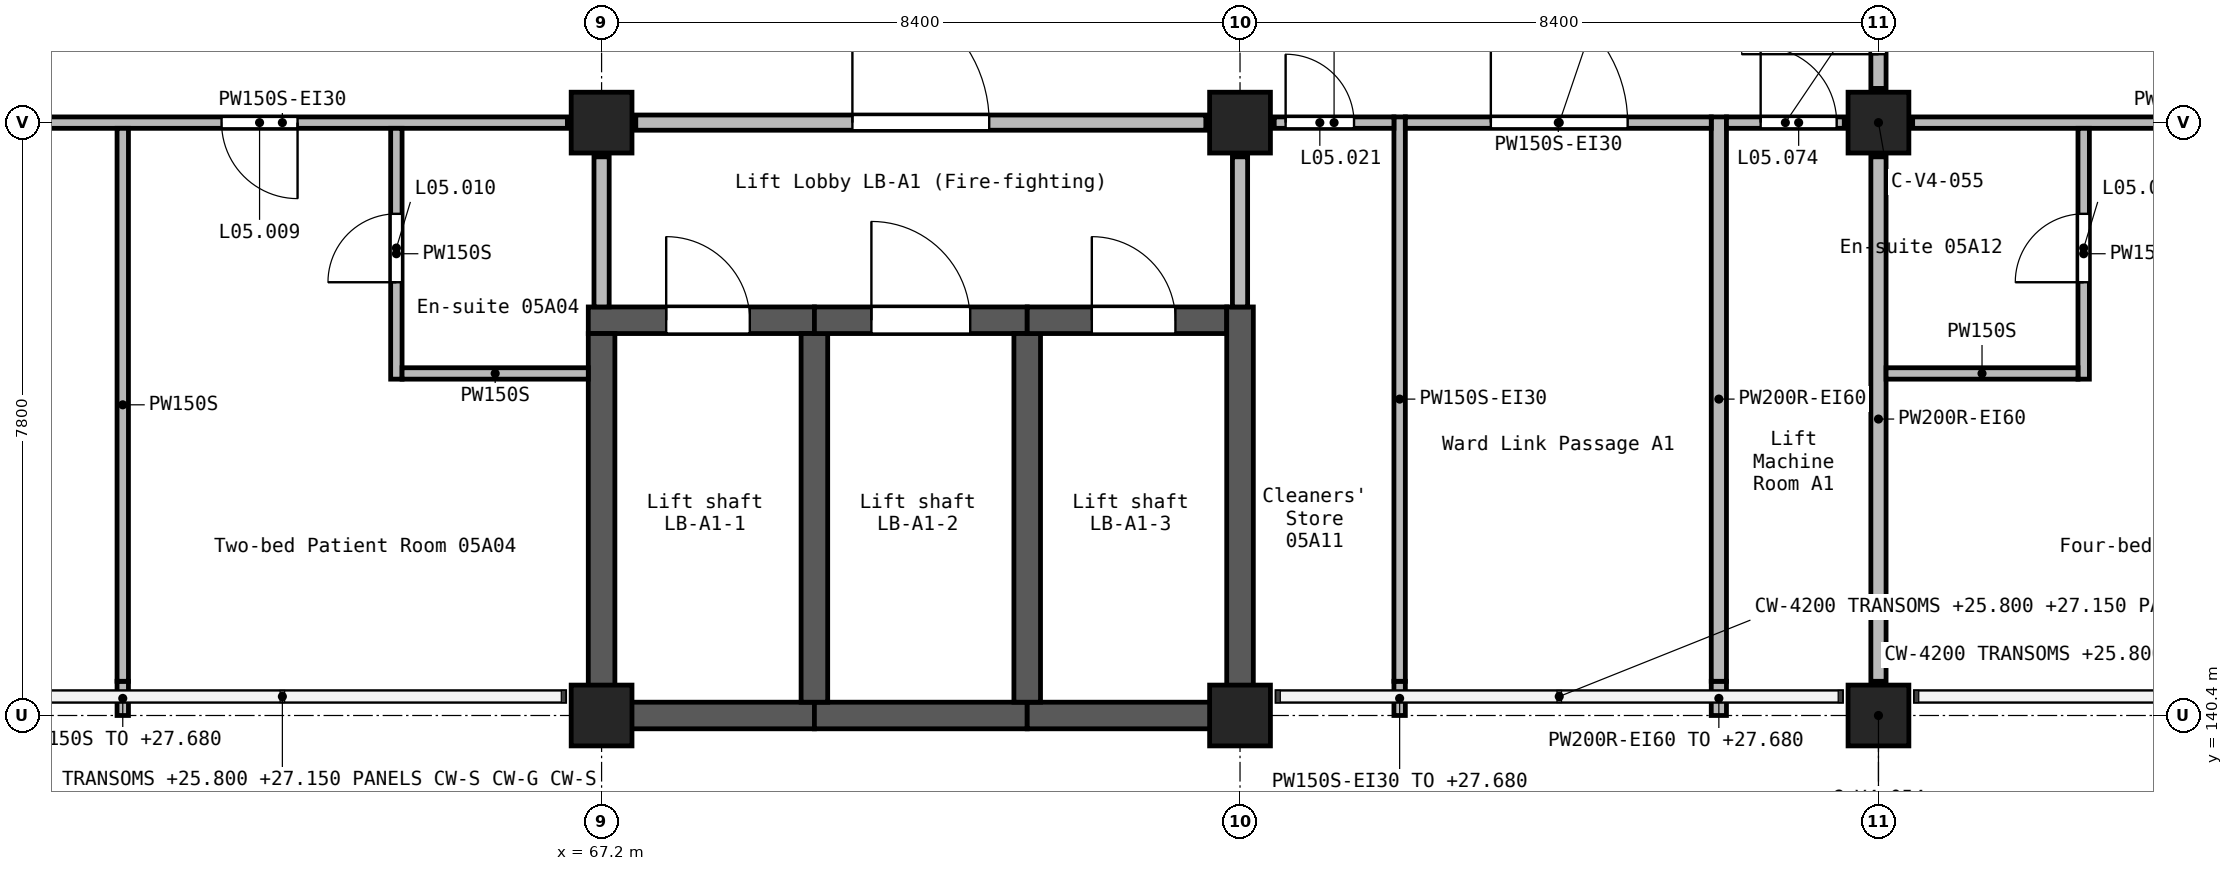
"""IFC4 building model, lengths in metres.
Left out: names, types, materials, properties, quantities, classifications, styles, units other than length and angle.
Written with IfcOpenShell. Run it as: python <this file> out.ifc"""

import sys

from ifc_helpers import new_model, si_unit, direction, frame, frame_2d, origin, origin_2d, place, context, subcontext, project, spatial, rectangle, extrude, element, fill, save


model = new_model("IFC4")
c1 = context("Model", 3, precision=1e-05, world=origin(), true_north=direction((0.0, 1.0)))
c2 = subcontext(c1, "Body", "Model", "MODEL_VIEW")
j1 = project(units=[si_unit("LENGTHUNIT", "METRE"), si_unit("PLANEANGLEUNIT", "RADIAN")], contexts=[c1])
p1 = place(None, origin())
s1 = spatial("IfcSite", under=j1, at=p1, CompositionType="ELEMENT")
p2 = place(p1, origin())
s2 = spatial("IfcBuilding", under=s1, at=p2, CompositionType="ELEMENT")
p3 = place(p2, frame((0.0, 0.0, 24.9)))
s3 = spatial("IfcBuildingStorey", under=s2, at=p3, CompositionType="ELEMENT", Elevation=24.9)
for number, where, z_axis, x_axis in (
    (1, (67.2, 140.4, 0.0), (0.0, 0.0, 1.0), (1.0, 0.0, 0.0)),
    (2, (67.2, 148.2, 0.0), (0.0, 0.0, 1.0), (1.0, 0.0, 0.0)),
    (3, (75.6, 140.4, 0.0), (0.0, 0.0, 1.0), (1.0, 0.0, 0.0)),
    (4, (75.6, 148.2, 0.0), (0.0, 0.0, 1.0), (1.0, 0.0, 0.0)),
    (5, (84.0, 140.4, 0.0), (0.0, 0.0, 1.0), (1.0, 0.0, 0.0)),
    (6, (84.0, 148.2, 0.0), (0.0, 0.0, 1.0), (1.0, 0.0, 0.0)),
):
    element("IfcColumn", number, at=place(p3, frame(where, z_axis=z_axis, x_axis=x_axis)), inside=s3, PredefinedType="COLUMN", context=c2, shape_type="SweptSolid", body=[
        extrude(rectangle(XDim=0.8, YDim=0.8, at=origin_2d()), origin(), (0.0, 0.0, 1.0), 3.9),
    ])
p4 = place(p3, frame((67.025, 145.6, 0.0), z_axis=(0.0, 0.0, 1.0), x_axis=(1.0, 0.0, 0.0)))
e7 = element("IfcWall", 7, at=p4, inside=s3, PredefinedType="SHEAR", context=c2, shape_type="SweptSolid", body=[
    extrude(rectangle(XDim=2.975, YDim=0.35, at=frame_2d((1.488, 0.0))), origin(), (0.0, 0.0, 1.0), 3.9),
])
p5 = place(p4, frame((1.025, 0.0, 0.0)))
e8 = element("IfcOpeningElement", 8, at=p5, cuts=e7, PredefinedType="OPENING", context=c2, shape_type="SweptSolid", body=[
    extrude(rectangle(XDim=1.1, YDim=2.1, at=frame_2d((0.55, 1.05))), frame((0.0, 0.185, 0.0), z_axis=(0.0, -1.0, 0.0), x_axis=(1.0, 0.0, 0.0)), (0.0, 0.0, 1.0), 0.37),
])
p6 = place(p3, frame((67.2, 140.225, 0.0), z_axis=(0.0, 0.0, 1.0), x_axis=(0.0, 1.0, 0.0)))
e9 = element("IfcWall", 9, at=p6, inside=s3, PredefinedType="SHEAR", context=c2, shape_type="SweptSolid", body=[
    extrude(rectangle(XDim=5.2, YDim=0.35, at=frame_2d((2.6, 0.0))), origin(), (0.0, 0.0, 1.0), 3.9),
])
p7 = place(p3, frame((67.375, 140.4, 0.0), z_axis=(0.0, 0.0, 1.0), x_axis=(1.0, 0.0, 0.0)))
e10 = element("IfcWall", 10, at=p7, inside=s3, PredefinedType="SHEAR", context=c2, shape_type="SweptSolid", body=[
    extrude(rectangle(XDim=2.625, YDim=0.35, at=frame_2d((1.312, 0.0))), origin(), (0.0, 0.0, 1.0), 3.9),
])
p8 = place(p3, frame((70.0, 140.4, 0.0), z_axis=(0.0, 0.0, 1.0), x_axis=(1.0, 0.0, 0.0)))
e11 = element("IfcWall", 11, at=p8, inside=s3, PredefinedType="SHEAR", context=c2, shape_type="SweptSolid", body=[
    extrude(rectangle(XDim=2.8, YDim=0.35, at=frame_2d((1.4, 0.0))), origin(), (0.0, 0.0, 1.0), 3.9),
])
p9 = place(p3, frame((70.0, 140.575, 0.0), z_axis=(0.0, 0.0, 1.0), x_axis=(0.0, 1.0, 0.0)))
e12 = element("IfcWall", 12, at=p9, inside=s3, PredefinedType="SHEAR", context=c2, shape_type="SweptSolid", body=[
    extrude(rectangle(XDim=4.85, YDim=0.35, at=frame_2d((2.425, 0.0))), origin(), (0.0, 0.0, 1.0), 3.9),
])
p10 = place(p3, frame((70.0, 145.6, 0.0), z_axis=(0.0, 0.0, 1.0), x_axis=(1.0, 0.0, 0.0)))
e13 = element("IfcWall", 13, at=p10, inside=s3, PredefinedType="SHEAR", context=c2, shape_type="SweptSolid", body=[
    extrude(rectangle(XDim=2.8, YDim=0.35, at=frame_2d((1.4, 0.0))), origin(), (0.0, 0.0, 1.0), 3.9),
])
p11 = place(p10, frame((0.75, 0.0, 0.0)))
e14 = element("IfcOpeningElement", 14, at=p11, cuts=e13, PredefinedType="OPENING", context=c2, shape_type="SweptSolid", body=[
    extrude(rectangle(XDim=1.3, YDim=2.1, at=frame_2d((0.65, 1.05))), frame((0.0, 0.185, 0.0), z_axis=(0.0, -1.0, 0.0), x_axis=(1.0, 0.0, 0.0)), (0.0, 0.0, 1.0), 0.37),
])
p12 = place(p3, frame((72.8, 140.4, 0.0), z_axis=(0.0, 0.0, 1.0), x_axis=(1.0, 0.0, 0.0)))
e15 = element("IfcWall", 15, at=p12, inside=s3, PredefinedType="SHEAR", context=c2, shape_type="SweptSolid", body=[
    extrude(rectangle(XDim=2.625, YDim=0.35, at=frame_2d((1.312, 0.0))), origin(), (0.0, 0.0, 1.0), 3.9),
])
p13 = place(p3, frame((72.8, 140.575, 0.0), z_axis=(0.0, 0.0, 1.0), x_axis=(0.0, 1.0, 0.0)))
e16 = element("IfcWall", 16, at=p13, inside=s3, PredefinedType="SHEAR", context=c2, shape_type="SweptSolid", body=[
    extrude(rectangle(XDim=4.85, YDim=0.35, at=frame_2d((2.425, 0.0))), origin(), (0.0, 0.0, 1.0), 3.9),
])
p14 = place(p3, frame((72.8, 145.6, 0.0), z_axis=(0.0, 0.0, 1.0), x_axis=(1.0, 0.0, 0.0)))
e17 = element("IfcWall", 17, at=p14, inside=s3, PredefinedType="SHEAR", context=c2, shape_type="SweptSolid", body=[
    extrude(rectangle(XDim=2.625, YDim=0.35, at=frame_2d((1.312, 0.0))), origin(), (0.0, 0.0, 1.0), 3.9),
])
p15 = place(p14, frame((0.85, 0.0, 0.0)))
e18 = element("IfcOpeningElement", 18, at=p15, cuts=e17, PredefinedType="OPENING", context=c2, shape_type="SweptSolid", body=[
    extrude(rectangle(XDim=1.1, YDim=2.1, at=frame_2d((0.55, 1.05))), frame((0.0, 0.185, 0.0), z_axis=(0.0, -1.0, 0.0), x_axis=(1.0, 0.0, 0.0)), (0.0, 0.0, 1.0), 0.37),
])
p16 = place(p3, frame((75.6, 140.225, 0.0), z_axis=(0.0, 0.0, 1.0), x_axis=(0.0, 1.0, 0.0)))
e19 = element("IfcWall", 19, at=p16, inside=s3, PredefinedType="SHEAR", context=c2, shape_type="SweptSolid", body=[
    extrude(rectangle(XDim=5.55, YDim=0.35, at=frame_2d((2.775, 0.0))), origin(), (0.0, 0.0, 1.0), 3.9),
])
p17 = place(p3, frame((84.0, 148.65, 0.0), z_axis=(0.0, 0.0, 1.0), x_axis=(0.0, 1.0, 0.0)))
e20 = element("IfcWall", 20, at=p17, inside=s3, PredefinedType="SOLIDWALL", context=c2, shape_type="SweptSolid", body=[
    extrude(rectangle(XDim=2.7, YDim=0.2, at=frame_2d((1.35, 0.0))), origin(), (0.0, 0.0, 1.0), 3.6),
])
p18 = place(p17, frame((0.45, 0.0, 0.0)))
e21 = element("IfcOpeningElement", 21, at=p18, cuts=e20, PredefinedType="OPENING", context=c2, shape_type="SweptSolid", body=[
    extrude(rectangle(XDim=1.8, YDim=2.1, at=frame_2d((0.9, 1.05))), frame((0.0, 0.11, 0.0), z_axis=(0.0, -1.0, 0.0), x_axis=(1.0, 0.0, 0.0)), (0.0, 0.0, 1.0), 0.22),
])
p19 = place(p3, frame((67.65, 148.2, 0.0), z_axis=(0.0, 0.0, 1.0), x_axis=(1.0, 0.0, 0.0)))
e22 = element("IfcWall", 22, at=p19, inside=s3, PredefinedType="SOLIDWALL", context=c2, shape_type="SweptSolid", body=[
    extrude(rectangle(XDim=7.5, YDim=0.2, at=frame_2d((3.75, 0.0))), origin(), (0.0, 0.0, 1.0), 3.6),
])
p20 = place(p19, frame((2.85, 0.0, 0.0)))
e23 = element("IfcOpeningElement", 23, at=p20, cuts=e22, PredefinedType="OPENING", context=c2, shape_type="SweptSolid", body=[
    extrude(rectangle(XDim=1.8, YDim=2.1, at=frame_2d((0.9, 1.05))), frame((0.0, 0.11, 0.0), z_axis=(0.0, -1.0, 0.0), x_axis=(1.0, 0.0, 0.0)), (0.0, 0.0, 1.0), 0.22),
])
p21 = place(p3, frame((81.9, 140.4, 0.0), z_axis=(0.0, 0.0, 1.0), x_axis=(0.0, 1.0, 0.0)))
e24 = element("IfcWall", 24, at=p21, inside=s3, PredefinedType="SOLIDWALL", context=c2, shape_type="SweptSolid", body=[
    extrude(rectangle(XDim=0.45, YDim=0.2, at=frame_2d((0.225, 0.0))), origin(), (0.0, 0.0, 1.0), 2.78),
])
p22 = place(p3, frame((81.9, 140.85, 0.0), z_axis=(0.0, 0.0, 1.0), x_axis=(0.0, 1.0, 0.0)))
e25 = element("IfcWall", 25, at=p22, inside=s3, PredefinedType="SOLIDWALL", context=c2, shape_type="SweptSolid", body=[
    extrude(rectangle(XDim=7.425, YDim=0.2, at=frame_2d((3.712, 0.0))), origin(), (0.0, 0.0, 1.0), 3.6),
])
p23 = place(p3, frame((84.0, 140.85, 0.0), z_axis=(0.0, 0.0, 1.0), x_axis=(0.0, 1.0, 0.0)))
e26 = element("IfcWall", 26, at=p23, inside=s3, PredefinedType="SOLIDWALL", context=c2, shape_type="SweptSolid", body=[
    extrude(rectangle(XDim=6.9, YDim=0.2, at=frame_2d((3.45, 0.0))), origin(), (0.0, 0.0, 1.0), 3.6),
])
for number, where, z_axis, x_axis in (
    (27, (67.2, 145.775, 0.0), (0.0, 0.0, 1.0), (0.0, 1.0, 0.0)),
    (28, (75.6, 145.775, 0.0), (0.0, 0.0, 1.0), (0.0, 1.0, 0.0)),
):
    element("IfcWall", number, at=place(p3, frame(where, z_axis=z_axis, x_axis=x_axis)), inside=s3, PredefinedType="SOLIDWALL", context=c2, shape_type="SweptSolid", body=[
        extrude(rectangle(XDim=1.975, YDim=0.2, at=frame_2d((0.988, 0.0))), origin(), (0.0, 0.0, 1.0), 3.6),
    ])
p24 = place(p3, frame((91.95, 148.2, 0.0), z_axis=(0.0, 0.0, 1.0), x_axis=(-1.0, 0.0, 0.0)))
e29 = element("IfcWall", 29, at=p24, inside=s3, PredefinedType="PARTITIONING", context=c2, shape_type="SweptSolid", body=[
    extrude(rectangle(XDim=7.5, YDim=0.15, at=frame_2d((3.75, 0.0))), origin(), (0.0, 0.0, 1.0), 3.6),
])
p25 = place(p24, frame((1.9, 0.0, 0.0)))
e30 = element("IfcOpeningElement", 30, at=p25, cuts=e29, PredefinedType="OPENING", context=c2, shape_type="SweptSolid", body=[
    extrude(rectangle(XDim=1.0, YDim=2.1, at=frame_2d((0.5, 1.05))), frame((0.0, 0.085, 0.0), z_axis=(0.0, -1.0, 0.0), x_axis=(1.0, 0.0, 0.0)), (0.0, 0.0, 1.0), 0.17),
])
p26 = place(p3, frame((66.75, 148.2, 0.0), z_axis=(0.0, 0.0, 1.0), x_axis=(-1.0, 0.0, 0.0)))
e31 = element("IfcWall", 31, at=p26, inside=s3, PredefinedType="PARTITIONING", context=c2, shape_type="SweptSolid", body=[
    extrude(rectangle(XDim=7.5, YDim=0.15, at=frame_2d((3.75, 0.0))), origin(), (0.0, 0.0, 1.0), 3.6),
])
p27 = place(p26, frame((3.55, 0.0, 0.0)))
e32 = element("IfcOpeningElement", 32, at=p27, cuts=e31, PredefinedType="OPENING", context=c2, shape_type="SweptSolid", body=[
    extrude(rectangle(XDim=1.0, YDim=2.1, at=frame_2d((0.5, 1.05))), frame((0.0, 0.085, 0.0), z_axis=(0.0, -1.0, 0.0), x_axis=(1.0, 0.0, 0.0)), (0.0, 0.0, 1.0), 0.17),
])
p28 = place(p3, frame((77.7, 140.4, 0.0), z_axis=(0.0, 0.0, 1.0), x_axis=(0.0, 1.0, 0.0)))
e33 = element("IfcWall", 33, at=p28, inside=s3, PredefinedType="PARTITIONING", context=c2, shape_type="SweptSolid", body=[
    extrude(rectangle(XDim=0.45, YDim=0.15, at=frame_2d((0.225, 0.0))), origin(), (0.0, 0.0, 1.0), 2.78),
])
p29 = place(p3, frame((77.7, 140.85, 0.0), z_axis=(0.0, 0.0, 1.0), x_axis=(0.0, 1.0, 0.0)))
e34 = element("IfcWall", 34, at=p29, inside=s3, PredefinedType="PARTITIONING", context=c2, shape_type="SweptSolid", body=[
    extrude(rectangle(XDim=7.425, YDim=0.15, at=frame_2d((3.712, 0.0))), origin(), (0.0, 0.0, 1.0), 3.6),
])
p30 = place(p3, frame((77.775, 148.2, 0.0), z_axis=(0.0, 0.0, 1.0), x_axis=(1.0, 0.0, 0.0)))
e35 = element("IfcWall", 35, at=p30, inside=s3, PredefinedType="PARTITIONING", context=c2, shape_type="SweptSolid", body=[
    extrude(rectangle(XDim=4.025, YDim=0.15, at=frame_2d((2.013, 0.0))), origin(), (0.0, 0.0, 1.0), 3.6),
])
p31 = place(p30, frame((1.125, 0.0, 0.0)))
e36 = element("IfcOpeningElement", 36, at=p31, cuts=e35, PredefinedType="OPENING", context=c2, shape_type="SweptSolid", body=[
    extrude(rectangle(XDim=1.8, YDim=2.1, at=frame_2d((0.9, 1.05))), frame((0.0, 0.085, 0.0), z_axis=(0.0, -1.0, 0.0), x_axis=(1.0, 0.0, 0.0)), (0.0, 0.0, 1.0), 0.17),
])
p32 = place(p3, frame((76.05, 148.2, 0.0), z_axis=(0.0, 0.0, 1.0), x_axis=(1.0, 0.0, 0.0)))
e37 = element("IfcWall", 37, at=p32, inside=s3, PredefinedType="PARTITIONING", context=c2, shape_type="SweptSolid", body=[
    extrude(rectangle(XDim=1.575, YDim=0.15, at=frame_2d((0.788, 0.0))), origin(), (0.0, 0.0, 1.0), 3.6),
])
p33 = place(p32, frame((0.15, 0.0, 0.0)))
e38 = element("IfcOpeningElement", 38, at=p33, cuts=e37, PredefinedType="OPENING", context=c2, shape_type="SweptSolid", body=[
    extrude(rectangle(XDim=0.9, YDim=2.1, at=frame_2d((0.45, 1.05))), frame((0.0, 0.085, 0.0), z_axis=(0.0, -1.0, 0.0), x_axis=(1.0, 0.0, 0.0)), (0.0, 0.0, 1.0), 0.17),
])
p34 = place(p3, frame((82.0, 148.2, 0.0), z_axis=(0.0, 0.0, 1.0), x_axis=(1.0, 0.0, 0.0)))
e39 = element("IfcWall", 39, at=p34, inside=s3, PredefinedType="PARTITIONING", context=c2, shape_type="SweptSolid", body=[
    extrude(rectangle(XDim=1.55, YDim=0.15, at=frame_2d((0.775, 0.0))), origin(), (0.0, 0.0, 1.0), 3.6),
])
p35 = place(p34, frame((0.45, 0.0, 0.0)))
e40 = element("IfcOpeningElement", 40, at=p35, cuts=e39, PredefinedType="OPENING", context=c2, shape_type="SweptSolid", body=[
    extrude(rectangle(XDim=1.0, YDim=2.1, at=frame_2d((0.5, 1.05))), frame((0.0, 0.085, 0.0), z_axis=(0.0, -1.0, 0.0), x_axis=(1.0, 0.0, 0.0)), (0.0, 0.0, 1.0), 0.17),
])
p36 = place(p3, frame((60.9, 140.4, 0.0), z_axis=(0.0, 0.0, 1.0), x_axis=(0.0, 1.0, 0.0)))
e41 = element("IfcWall", 41, at=p36, inside=s3, PredefinedType="PARTITIONING", context=c2, shape_type="SweptSolid", body=[
    extrude(rectangle(XDim=0.45, YDim=0.15, at=frame_2d((0.225, 0.0))), origin(), (0.0, 0.0, 1.0), 2.78),
])
p37 = place(p3, frame((60.9, 140.85, 0.0), z_axis=(0.0, 0.0, 1.0), x_axis=(0.0, 1.0, 0.0)))
e42 = element("IfcWall", 42, at=p37, inside=s3, PredefinedType="PARTITIONING", context=c2, shape_type="SweptSolid", body=[
    extrude(rectangle(XDim=7.275, YDim=0.15, at=frame_2d((3.637, 0.0))), origin(), (0.0, 0.0, 1.0), 3.6),
])
p38 = place(p3, frame((64.5, 144.825, 0.0), z_axis=(0.0, 0.0, 1.0), x_axis=(0.0, 1.0, 0.0)))
e43 = element("IfcWall", 43, at=p38, inside=s3, PredefinedType="PARTITIONING", context=c2, shape_type="SweptSolid", body=[
    extrude(rectangle(XDim=3.3, YDim=0.15, at=frame_2d((1.65, 0.0))), origin(), (0.0, 0.0, 1.0), 3.6),
])
p39 = place(p38, frame((1.275, 0.0, 0.0)))
e44 = element("IfcOpeningElement", 44, at=p39, cuts=e43, PredefinedType="OPENING", context=c2, shape_type="SweptSolid", body=[
    extrude(rectangle(XDim=0.9, YDim=2.1, at=frame_2d((0.45, 1.05))), frame((0.0, 0.085, 0.0), z_axis=(0.0, -1.0, 0.0), x_axis=(1.0, 0.0, 0.0)), (0.0, 0.0, 1.0), 0.17),
])
p40 = place(p3, frame((86.7, 144.825, 0.0), z_axis=(0.0, 0.0, 1.0), x_axis=(0.0, 1.0, 0.0)))
e45 = element("IfcWall", 45, at=p40, inside=s3, PredefinedType="PARTITIONING", context=c2, shape_type="SweptSolid", body=[
    extrude(rectangle(XDim=3.3, YDim=0.15, at=frame_2d((1.65, 0.0))), origin(), (0.0, 0.0, 1.0), 3.6),
])
p41 = place(p40, frame((1.275, 0.0, 0.0)))
e46 = element("IfcOpeningElement", 46, at=p41, cuts=e45, PredefinedType="OPENING", context=c2, shape_type="SweptSolid", body=[
    extrude(rectangle(XDim=0.9, YDim=2.1, at=frame_2d((0.45, 1.05))), frame((0.0, 0.085, 0.0), z_axis=(0.0, -1.0, 0.0), x_axis=(1.0, 0.0, 0.0)), (0.0, 0.0, 1.0), 0.17),
])
p42 = place(p3, frame((64.575, 144.9, 0.0), z_axis=(0.0, 0.0, 1.0), x_axis=(1.0, 0.0, 0.0)))
e47 = element("IfcWall", 47, at=p42, inside=s3, PredefinedType="PARTITIONING", context=c2, shape_type="SweptSolid", body=[
    extrude(rectangle(XDim=2.45, YDim=0.15, at=frame_2d((1.225, 0.0))), origin(), (0.0, 0.0, 1.0), 3.6),
])
p43 = place(p3, frame((84.1, 144.9, 0.0), z_axis=(0.0, 0.0, 1.0), x_axis=(1.0, 0.0, 0.0)))
e48 = element("IfcWall", 48, at=p43, inside=s3, PredefinedType="PARTITIONING", context=c2, shape_type="SweptSolid", body=[
    extrude(rectangle(XDim=2.525, YDim=0.15, at=frame_2d((1.262, 0.0))), origin(), (0.0, 0.0, 1.0), 3.6),
])
p44 = place(p18, frame((1.8, 0.0, 0.0), z_axis=(0.0, 0.0, 1.0), x_axis=(-1.0, 0.0, 0.0)))
e49 = element("IfcDoor", 49, at=p44, inside=s3, OperationType="DOUBLE_DOOR_SINGLE_SWING", PredefinedType="DOOR", context=c2, shape_type="SweptSolid", body=[
    extrude(rectangle(XDim=1.8, YDim=2.1, at=frame_2d((0.9, 1.05))), frame((0.0, 0.025, 0.0), z_axis=(0.0, -1.0, 0.0), x_axis=(1.0, 0.0, 0.0)), (0.0, 0.0, 1.0), 0.05),
])
fill(e21, e49)
p45 = place(p27, origin())
e50 = element("IfcDoor", 50, at=p45, inside=s3, OperationType="SINGLE_SWING_RIGHT", PredefinedType="DOOR", context=c2, shape_type="SweptSolid", body=[
    extrude(rectangle(XDim=1.0, YDim=2.1, at=frame_2d((0.5, 1.05))), frame((0.0, 0.025, 0.0), z_axis=(0.0, -1.0, 0.0), x_axis=(1.0, 0.0, 0.0)), (0.0, 0.0, 1.0), 0.05),
])
fill(e32, e50)
p46 = place(p39, frame((0.9, 0.0, 0.0), z_axis=(0.0, 0.0, 1.0), x_axis=(-1.0, 0.0, 0.0)))
e51 = element("IfcDoor", 51, at=p46, inside=s3, OperationType="SINGLE_SWING_LEFT", PredefinedType="DOOR", context=c2, shape_type="SweptSolid", body=[
    extrude(rectangle(XDim=0.9, YDim=2.1, at=frame_2d((0.45, 1.05))), frame((0.0, 0.025, 0.0), z_axis=(0.0, -1.0, 0.0), x_axis=(1.0, 0.0, 0.0)), (0.0, 0.0, 1.0), 0.05),
])
fill(e44, e51)
p47 = place(p33, frame((0.9, 0.0, 0.0), z_axis=(0.0, 0.0, 1.0), x_axis=(-1.0, 0.0, 0.0)))
e52 = element("IfcDoor", 52, at=p47, inside=s3, OperationType="SINGLE_SWING_RIGHT", PredefinedType="DOOR", context=c2, shape_type="SweptSolid", body=[
    extrude(rectangle(XDim=0.9, YDim=2.1, at=frame_2d((0.45, 1.05))), frame((0.0, 0.025, 0.0), z_axis=(0.0, -1.0, 0.0), x_axis=(1.0, 0.0, 0.0)), (0.0, 0.0, 1.0), 0.05),
])
fill(e38, e52)
p48 = place(p41, origin())
e53 = element("IfcDoor", 53, at=p48, inside=s3, OperationType="SINGLE_SWING_RIGHT", PredefinedType="DOOR", context=c2, shape_type="SweptSolid", body=[
    extrude(rectangle(XDim=0.9, YDim=2.1, at=frame_2d((0.45, 1.05))), frame((0.0, 0.025, 0.0), z_axis=(0.0, -1.0, 0.0), x_axis=(1.0, 0.0, 0.0)), (0.0, 0.0, 1.0), 0.05),
])
fill(e46, e53)
p49 = place(p31, frame((1.8, 0.0, 0.0), z_axis=(0.0, 0.0, 1.0), x_axis=(-1.0, 0.0, 0.0)))
e54 = element("IfcDoor", 54, at=p49, inside=s3, OperationType="DOUBLE_DOOR_SINGLE_SWING", PredefinedType="DOOR", context=c2, shape_type="SweptSolid", body=[
    extrude(rectangle(XDim=1.8, YDim=2.1, at=frame_2d((0.9, 1.05))), frame((0.0, 0.025, 0.0), z_axis=(0.0, -1.0, 0.0), x_axis=(1.0, 0.0, 0.0)), (0.0, 0.0, 1.0), 0.05),
])
fill(e36, e54)
p50 = place(p20, frame((1.8, 0.0, 0.0), z_axis=(0.0, 0.0, 1.0), x_axis=(-1.0, 0.0, 0.0)))
e55 = element("IfcDoor", 55, at=p50, inside=s3, OperationType="DOUBLE_DOOR_SINGLE_SWING", PredefinedType="DOOR", context=c2, shape_type="SweptSolid", body=[
    extrude(rectangle(XDim=1.8, YDim=2.1, at=frame_2d((0.9, 1.05))), frame((0.0, 0.025, 0.0), z_axis=(0.0, -1.0, 0.0), x_axis=(1.0, 0.0, 0.0)), (0.0, 0.0, 1.0), 0.05),
])
fill(e23, e55)
p51 = place(p35, frame((1.0, 0.0, 0.0), z_axis=(0.0, 0.0, 1.0), x_axis=(-1.0, 0.0, 0.0)))
e56 = element("IfcDoor", 56, at=p51, inside=s3, OperationType="SINGLE_SWING_LEFT", PredefinedType="DOOR", context=c2, shape_type="SweptSolid", body=[
    extrude(rectangle(XDim=1.0, YDim=2.1, at=frame_2d((0.5, 1.05))), frame((0.0, 0.025, 0.0), z_axis=(0.0, -1.0, 0.0), x_axis=(1.0, 0.0, 0.0)), (0.0, 0.0, 1.0), 0.05),
])
fill(e40, e56)
p52 = place(p5, origin())
e57 = element("IfcDoor", 57, at=p52, inside=s3, OperationType="DOUBLE_DOOR_SLIDING", PredefinedType="DOOR", context=c2, shape_type="SweptSolid", body=[
    extrude(rectangle(XDim=1.1, YDim=2.1, at=frame_2d((0.55, 1.05))), frame((0.0, 0.025, 0.0), z_axis=(0.0, -1.0, 0.0), x_axis=(1.0, 0.0, 0.0)), (0.0, 0.0, 1.0), 0.05),
])
fill(e8, e57)
p53 = place(p11, origin())
e58 = element("IfcDoor", 58, at=p53, inside=s3, OperationType="DOUBLE_DOOR_SLIDING", PredefinedType="DOOR", context=c2, shape_type="SweptSolid", body=[
    extrude(rectangle(XDim=1.3, YDim=2.1, at=frame_2d((0.65, 1.05))), frame((0.0, 0.025, 0.0), z_axis=(0.0, -1.0, 0.0), x_axis=(1.0, 0.0, 0.0)), (0.0, 0.0, 1.0), 0.05),
])
fill(e14, e58)
p54 = place(p15, origin())
e59 = element("IfcDoor", 59, at=p54, inside=s3, OperationType="DOUBLE_DOOR_SLIDING", PredefinedType="DOOR", context=c2, shape_type="SweptSolid", body=[
    extrude(rectangle(XDim=1.1, YDim=2.1, at=frame_2d((0.55, 1.05))), frame((0.0, 0.025, 0.0), z_axis=(0.0, -1.0, 0.0), x_axis=(1.0, 0.0, 0.0)), (0.0, 0.0, 1.0), 0.05),
])
fill(e18, e59)
save(model, sys.argv[1])
